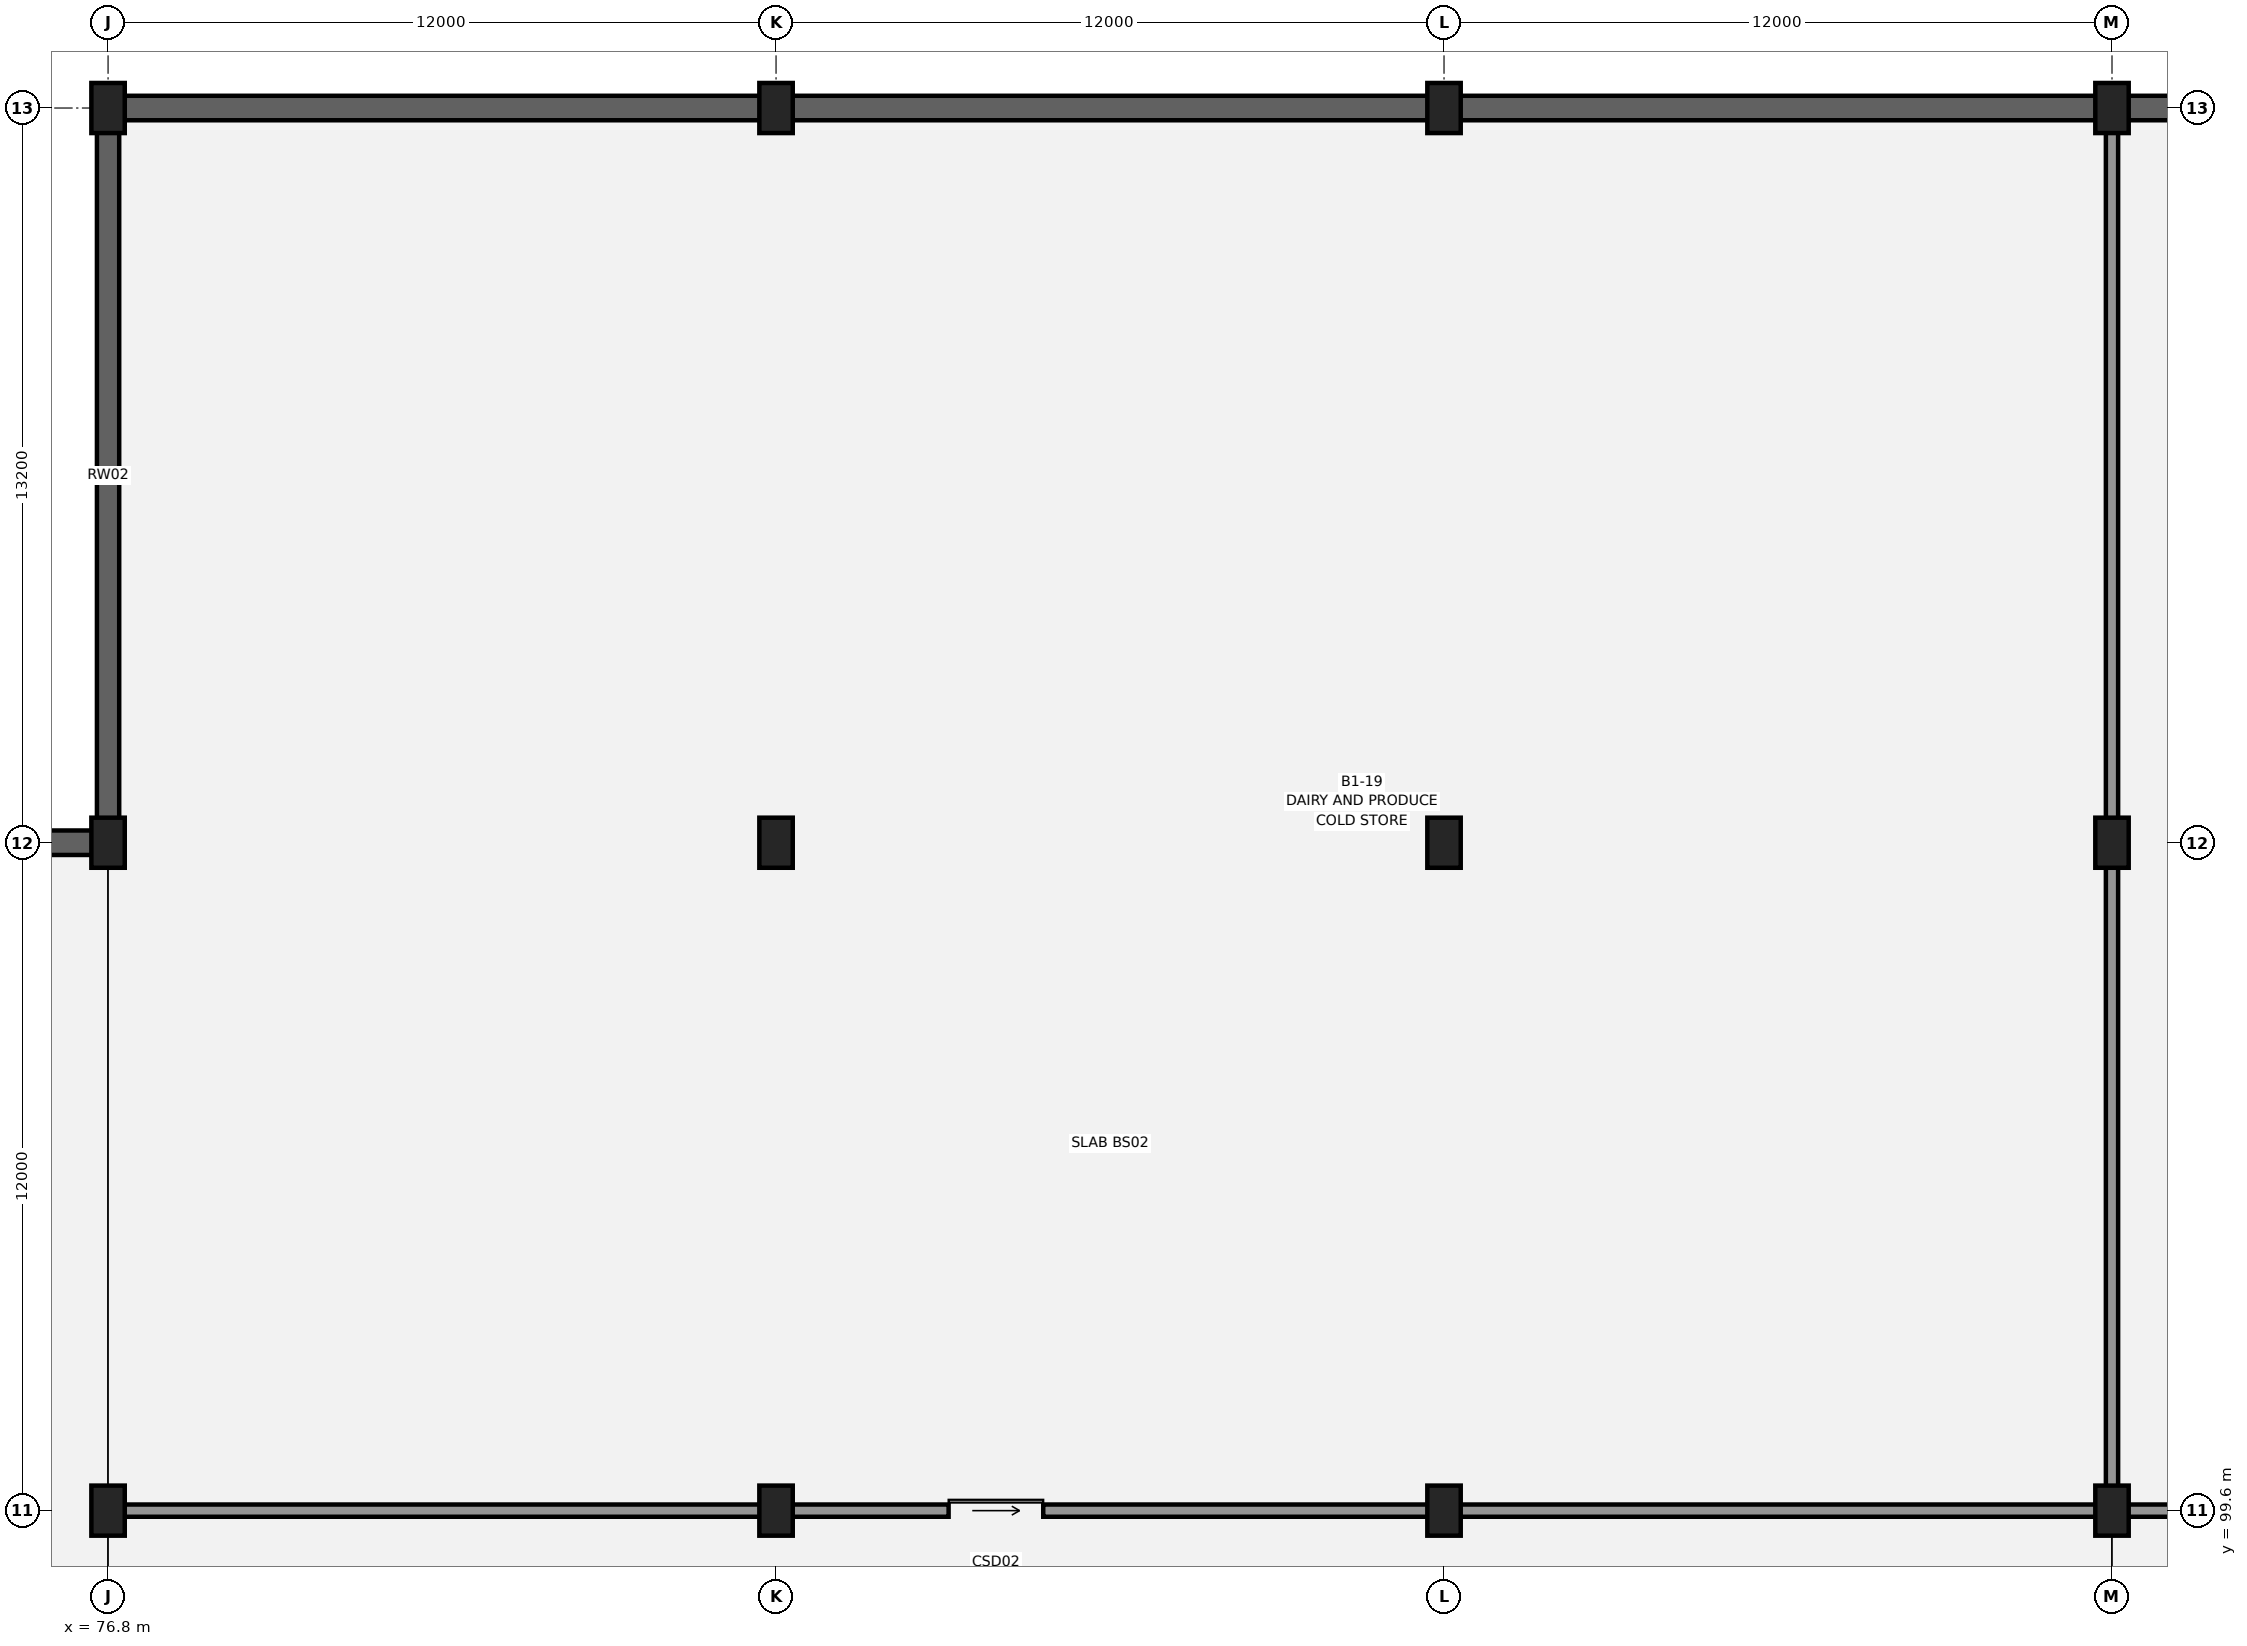
"""IFC4 building model, lengths in metres.
Left out: names, types, materials, properties, quantities, classifications, styles, units other than length and angle.
Written with IfcOpenShell. Run it as: python <this file> out.ifc"""

import sys

from ifc_helpers import new_model, si_unit, direction, frame, frame_2d, origin, origin_2d, place, context, subcontext, project, spatial, rectangle, extrude, element, fill, save


model = new_model("IFC4")
c1 = context("Model", 3, precision=1e-05, world=origin(), true_north=direction((0.0, 1.0)))
c2 = subcontext(c1, "Body", "Model", "MODEL_VIEW")
j1 = project(units=[si_unit("LENGTHUNIT", "METRE"), si_unit("PLANEANGLEUNIT", "RADIAN")], contexts=[c1])
p1 = place(None, origin())
s1 = spatial("IfcSite", under=j1, at=p1, CompositionType="ELEMENT")
p2 = place(p1, origin())
s2 = spatial("IfcBuilding", under=s1, at=p2, CompositionType="ELEMENT")
p3 = place(p2, frame((0.0, 0.0, -4.8)))
s3 = spatial("IfcBuildingStorey", under=s2, at=p3, CompositionType="ELEMENT", Elevation=-4.8)
p4 = place(p3, frame((148.8, 124.8, 0.0), z_axis=(0.0, 0.0, 1.0), x_axis=(-1.0, 0.0, 0.0)))
e1 = element("IfcWall", 1, at=p4, inside=s3, PredefinedType="USERDEFINED", context=c2, shape_type="SweptSolid", body=[
    extrude(rectangle(XDim=72.0, YDim=0.44, at=frame_2d((36.0, 0.0))), origin(), (0.0, 0.0, 1.0), 4.46),
])
p5 = place(p3, frame((76.8, 124.8, 0.0), z_axis=(0.0, 0.0, 1.0), x_axis=(0.0, -1.0, 0.0)))
e2 = element("IfcWall", 2, at=p5, inside=s3, PredefinedType="USERDEFINED", context=c2, shape_type="SweptSolid", body=[
    extrude(rectangle(XDim=13.2, YDim=0.4, at=frame_2d((6.6, 0.0))), origin(), (0.0, 0.0, 1.0), 4.46),
])
p6 = place(p3, frame((76.8, 111.6, 0.0), z_axis=(0.0, 0.0, 1.0), x_axis=(-1.0, 0.0, 0.0)))
e3 = element("IfcWall", 3, at=p6, inside=s3, PredefinedType="USERDEFINED", context=c2, shape_type="SweptSolid", body=[
    extrude(rectangle(XDim=57.6, YDim=0.44, at=frame_2d((28.8, 0.0))), origin(), (0.0, 0.0, 1.0), 4.46),
])
for number, where, z_axis, x_axis in (
    (4, (76.8, 99.6, 0.0), (0.0, 0.0, 1.0), (1.0, 0.0, 0.0)),
    (5, (76.8, 111.6, 0.0), (0.0, 0.0, 1.0), (1.0, 0.0, 0.0)),
    (6, (76.8, 124.8, 0.0), (0.0, 0.0, 1.0), (1.0, 0.0, 0.0)),
    (7, (88.8, 99.6, 0.0), (0.0, 0.0, 1.0), (1.0, 0.0, 0.0)),
    (8, (88.8, 111.6, 0.0), (0.0, 0.0, 1.0), (1.0, 0.0, 0.0)),
    (9, (88.8, 124.8, 0.0), (0.0, 0.0, 1.0), (1.0, 0.0, 0.0)),
    (10, (100.8, 99.6, 0.0), (0.0, 0.0, 1.0), (1.0, 0.0, 0.0)),
    (11, (100.8, 111.6, 0.0), (0.0, 0.0, 1.0), (1.0, 0.0, 0.0)),
    (12, (100.8, 124.8, 0.0), (0.0, 0.0, 1.0), (1.0, 0.0, 0.0)),
    (13, (112.8, 99.6, 0.0), (0.0, 0.0, 1.0), (1.0, 0.0, 0.0)),
    (14, (112.8, 111.6, 0.0), (0.0, 0.0, 1.0), (1.0, 0.0, 0.0)),
    (15, (112.8, 124.8, 0.0), (0.0, 0.0, 1.0), (1.0, 0.0, 0.0)),
):
    element("IfcColumn", number, at=place(p3, frame(where, z_axis=z_axis, x_axis=x_axis)), inside=s3, PredefinedType="COLUMN", context=c2, shape_type="SweptSolid", body=[
        extrude(rectangle(XDim=0.6, YDim=0.9, at=origin_2d()), origin(), (0.0, 0.0, 1.0), 4.8),
    ])
p7 = place(p3, frame((77.1, 99.6, 0.0), z_axis=(0.0, 0.0, 1.0), x_axis=(1.0, 0.0, 0.0)))
e16 = element("IfcWall", 16, at=p7, inside=s3, PredefinedType="PARTITIONING", context=c2, shape_type="SweptSolid", body=[
    extrude(rectangle(XDim=71.498, YDim=0.22, at=frame_2d((35.749, 0.0))), origin(), (0.0, 0.0, 1.0), 3.605),
])
p8 = place(p7, frame((14.8, 0.0, 0.0)))
e17 = element("IfcOpeningElement", 17, at=p8, cuts=e16, PredefinedType="OPENING", context=c2, shape_type="SweptSolid", body=[
    extrude(rectangle(XDim=1.7, YDim=2.5, at=frame_2d((0.85, 1.25))), frame((0.0, 0.12, 0.0), z_axis=(0.0, -1.0, 0.0), x_axis=(1.0, 0.0, 0.0)), (0.0, 0.0, 1.0), 0.24),
])
p9 = place(p7, frame((50.8, 0.0, 0.0)))
e18 = element("IfcOpeningElement", 18, at=p9, cuts=e16, PredefinedType="OPENING", context=c2, shape_type="SweptSolid", body=[
    extrude(rectangle(XDim=1.7, YDim=2.5, at=frame_2d((0.85, 1.25))), frame((0.0, 0.12, 0.0), z_axis=(0.0, -1.0, 0.0), x_axis=(1.0, 0.0, 0.0)), (0.0, 0.0, 1.0), 0.24),
])
p10 = place(p3, frame((112.8, 99.712, 0.0), z_axis=(0.0, 0.0, 1.0), x_axis=(0.0, 1.0, 0.0)))
e19 = element("IfcWall", 19, at=p10, inside=s3, PredefinedType="PARTITIONING", context=c2, shape_type="SweptSolid", body=[
    extrude(rectangle(XDim=24.866, YDim=0.22, at=frame_2d((12.433, 0.0))), origin(), (0.0, 0.0, 1.0), 3.915),
])
p11 = place(p8, origin())
e20 = element("IfcDoor", 20, at=p11, inside=s3, OperationType="SLIDING_TO_RIGHT", PredefinedType="DOOR", context=c2, shape_type="SweptSolid", body=[
    extrude(rectangle(XDim=1.7, YDim=2.5, at=frame_2d((0.85, 1.25))), frame((0.0, 0.025, 0.0), z_axis=(0.0, -1.0, 0.0), x_axis=(1.0, 0.0, 0.0)), (0.0, 0.0, 1.0), 0.05),
])
fill(e17, e20)
save(model, sys.argv[1])
